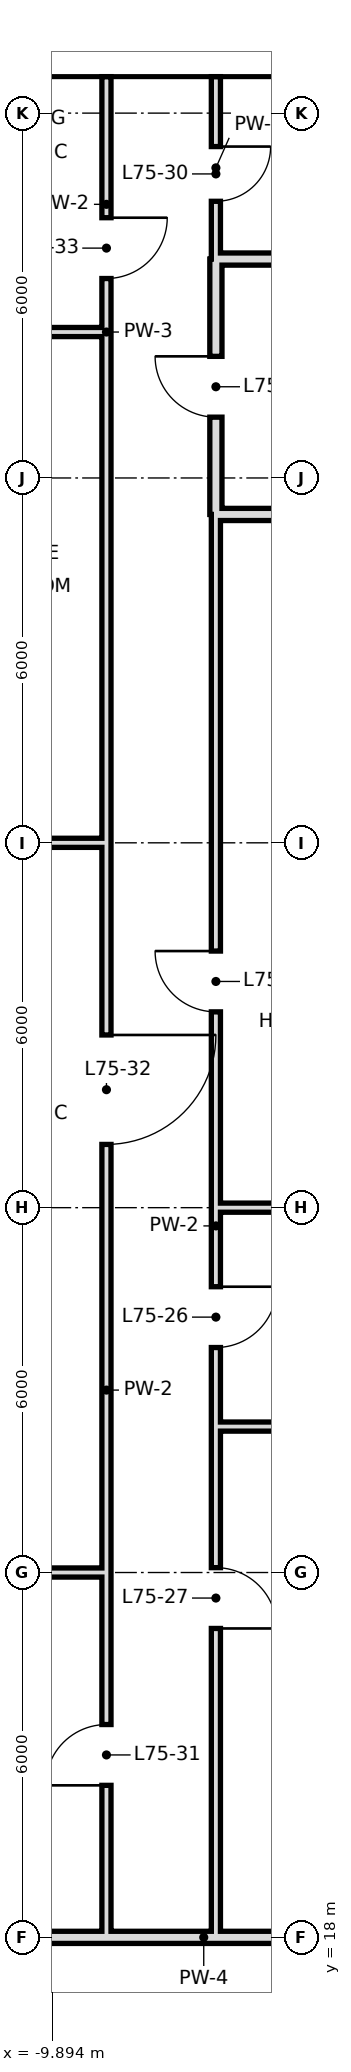
"""IFC4 building model, lengths in metres.
Left out: names, types, materials, properties, quantities, classifications, styles, units other than length and angle.
Written with IfcOpenShell. Run it as: python <this file> out.ifc"""

import sys

from ifc_helpers import new_model, si_unit, direction, frame, frame_2d, origin, place, context, subcontext, project, spatial, rectangle, extrude, element, fill, save


model = new_model("IFC4")
c1 = context("Model", 3, precision=1e-05, world=origin(), true_north=direction((0.0, 1.0)))
c2 = subcontext(c1, "Body", "Model", "MODEL_VIEW")
j1 = project(units=[si_unit("LENGTHUNIT", "METRE"), si_unit("PLANEANGLEUNIT", "RADIAN")], contexts=[c1])
p1 = place(None, origin())
s1 = spatial("IfcSite", under=j1, at=p1, CompositionType="ELEMENT")
p2 = place(p1, origin())
s2 = spatial("IfcBuilding", under=s1, at=p2, CompositionType="ELEMENT")
p3 = place(p2, frame((0.0, 0.0, 316.0)))
s3 = spatial("IfcBuildingStorey", under=s2, at=p3, CompositionType="ELEMENT", Elevation=316.0)
p4 = place(p3, frame((-7.2, 41.4, 0.0), z_axis=(0.0, 0.0, 1.0), x_axis=(0.0, 1.0, 0.0)))
e1 = element("IfcWall", 1, at=p4, inside=s3, PredefinedType="SOLIDWALL", context=c2, shape_type="SweptSolid", body=[
    extrude(rectangle(XDim=4.2, YDim=0.2, at=frame_2d((2.1, 0.0))), origin(), (0.0, 0.0, 1.0), 2.72),
])
p5 = place(p4, frame((1.6, 0.0, 0.0)))
e2 = element("IfcOpeningElement", 2, at=p5, cuts=e1, PredefinedType="OPENING", context=c2, shape_type="SweptSolid", body=[
    extrude(rectangle(XDim=1.0, YDim=2.4, at=frame_2d((0.5, 1.2))), frame((0.0, 0.11, 0.0), z_axis=(0.0, -1.0, 0.0), x_axis=(1.0, 0.0, 0.0)), (0.0, 0.0, 1.0), 0.22),
])
p6 = place(p3, frame((-7.2, 18.0, 0.0), z_axis=(0.0, 0.0, 1.0), x_axis=(0.0, 1.0, 0.0)))
e3 = element("IfcWall", 3, at=p6, inside=s3, PredefinedType="PARTITIONING", context=c2, shape_type="SweptSolid", body=[
    extrude(rectangle(XDim=23.4, YDim=0.15, at=frame_2d((11.7, 0.0))), origin(), (0.0, 0.0, 1.0), 3.42),
])
p7 = place(p6, frame((9.7, 0.0, 0.0)))
e4 = element("IfcOpeningElement", 4, at=p7, cuts=e3, PredefinedType="OPENING", context=c2, shape_type="SweptSolid", body=[
    extrude(rectangle(XDim=1.0, YDim=2.4, at=frame_2d((0.5, 1.2))), frame((0.0, 0.085, 0.0), z_axis=(0.0, -1.0, 0.0), x_axis=(1.0, 0.0, 0.0)), (0.0, 0.0, 1.0), 0.17),
])
p8 = place(p6, frame((5.08, 0.0, 0.0)))
e5 = element("IfcOpeningElement", 5, at=p8, cuts=e3, PredefinedType="OPENING", context=c2, shape_type="SweptSolid", body=[
    extrude(rectangle(XDim=1.0, YDim=2.4, at=frame_2d((0.5, 1.2))), frame((0.0, 0.085, 0.0), z_axis=(0.0, -1.0, 0.0), x_axis=(1.0, 0.0, 0.0)), (0.0, 0.0, 1.0), 0.17),
])
p9 = place(p6, frame((15.22, 0.0, 0.0)))
e6 = element("IfcOpeningElement", 6, at=p9, cuts=e3, PredefinedType="OPENING", context=c2, shape_type="SweptSolid", body=[
    extrude(rectangle(XDim=1.0, YDim=2.4, at=frame_2d((0.5, 1.2))), frame((0.0, 0.085, 0.0), z_axis=(0.0, -1.0, 0.0), x_axis=(1.0, 0.0, 0.0)), (0.0, 0.0, 1.0), 0.17),
])
p10 = place(p3, frame((-7.2, 45.6, 0.0), z_axis=(0.0, 0.0, 1.0), x_axis=(0.0, 1.0, 0.0)))
e7 = element("IfcWall", 7, at=p10, inside=s3, PredefinedType="PARTITIONING", context=c2, shape_type="SweptSolid", body=[
    extrude(rectangle(XDim=3.0, YDim=0.15, at=frame_2d((1.5, 0.0))), origin(), (0.0, 0.0, 1.0), 3.42),
])
p11 = place(p10, frame((0.95, 0.0, 0.0)))
e8 = element("IfcOpeningElement", 8, at=p11, cuts=e7, PredefinedType="OPENING", context=c2, shape_type="SweptSolid", body=[
    extrude(rectangle(XDim=0.9, YDim=2.4, at=frame_2d((0.45, 1.2))), frame((0.0, 0.085, 0.0), z_axis=(0.0, -1.0, 0.0), x_axis=(1.0, 0.0, 0.0)), (0.0, 0.0, 1.0), 0.17),
])
p12 = place(p3, frame((-9.0, 18.0, 0.0), z_axis=(0.0, 0.0, 1.0), x_axis=(0.0, 1.0, 0.0)))
e9 = element("IfcWall", 9, at=p12, inside=s3, PredefinedType="PARTITIONING", context=c2, shape_type="SweptSolid", body=[
    extrude(rectangle(XDim=18.0, YDim=0.15, at=frame_2d((9.0, 0.0))), origin(), (0.0, 0.0, 1.0), 3.42),
])
p13 = place(p12, frame((2.5, 0.0, 0.0)))
e10 = element("IfcOpeningElement", 10, at=p13, cuts=e9, PredefinedType="OPENING", context=c2, shape_type="SweptSolid", body=[
    extrude(rectangle(XDim=1.0, YDim=2.4, at=frame_2d((0.5, 1.2))), frame((0.0, 0.085, 0.0), z_axis=(0.0, -1.0, 0.0), x_axis=(1.0, 0.0, 0.0)), (0.0, 0.0, 1.0), 0.17),
])
p14 = place(p12, frame((13.04, 0.0, 0.0)))
e11 = element("IfcOpeningElement", 11, at=p14, cuts=e9, PredefinedType="OPENING", context=c2, shape_type="SweptSolid", body=[
    extrude(rectangle(XDim=1.8, YDim=2.4, at=frame_2d((0.9, 1.2))), frame((0.0, 0.085, 0.0), z_axis=(0.0, -1.0, 0.0), x_axis=(1.0, 0.0, 0.0)), (0.0, 0.0, 1.0), 0.17),
])
p15 = place(p3, frame((-9.0, 44.4, 0.0), z_axis=(0.0, 0.0, 1.0), x_axis=(0.0, 1.0, 0.0)))
e12 = element("IfcWall", 12, at=p15, inside=s3, PredefinedType="PARTITIONING", context=c2, shape_type="SweptSolid", body=[
    extrude(rectangle(XDim=4.2, YDim=0.15, at=frame_2d((2.1, 0.0))), origin(), (0.0, 0.0, 1.0), 3.42),
])
p16 = place(p15, frame((0.88, 0.0, 0.0)))
e13 = element("IfcOpeningElement", 13, at=p16, cuts=e12, PredefinedType="OPENING", context=c2, shape_type="SweptSolid", body=[
    extrude(rectangle(XDim=1.0, YDim=2.4, at=frame_2d((0.5, 1.2))), frame((0.0, 0.085, 0.0), z_axis=(0.0, -1.0, 0.0), x_axis=(1.0, 0.0, 0.0)), (0.0, 0.0, 1.0), 0.17),
])
p17 = place(p3, frame((-9.0, 36.0, 0.0), z_axis=(0.0, 0.0, 1.0), x_axis=(0.0, 1.0, 0.0)))
e14 = element("IfcWall", 14, at=p17, inside=s3, PredefinedType="PARTITIONING", context=c2, shape_type="SweptSolid", body=[
    extrude(rectangle(XDim=8.4, YDim=0.15, at=frame_2d((4.2, 0.0))), origin(), (0.0, 0.0, 1.0), 3.42),
])
p18 = place(p3, frame((-18.6, 18.0, 0.0), z_axis=(0.0, 0.0, 1.0), x_axis=(1.0, 0.0, 0.0)))
e15 = element("IfcWall", 15, at=p18, inside=s3, PredefinedType="SOLIDWALL", context=c2, shape_type="SweptSolid", body=[
    extrude(rectangle(XDim=21.7, YDim=0.2, at=frame_2d((10.85, 0.0))), origin(), (0.0, 0.0, 1.0), 2.72),
])
p19 = place(p3, frame((-18.0, 24.0, 0.0), z_axis=(0.0, 0.0, 1.0), x_axis=(1.0, 0.0, 0.0)))
e16 = element("IfcWall", 16, at=p19, inside=s3, PredefinedType="PARTITIONING", context=c2, shape_type="SweptSolid", body=[
    extrude(rectangle(XDim=9.0, YDim=0.15, at=frame_2d((4.5, 0.0))), origin(), (0.0, 0.0, 1.0), 2.72),
])
p20 = place(p3, frame((-7.2, 26.4, 0.0), z_axis=(0.0, 0.0, 1.0), x_axis=(1.0, 0.0, 0.0)))
e17 = element("IfcWall", 17, at=p20, inside=s3, PredefinedType="PARTITIONING", context=c2, shape_type="SweptSolid", body=[
    extrude(rectangle(XDim=10.3, YDim=0.15, at=frame_2d((5.15, 0.0))), origin(), (0.0, 0.0, 1.0), 3.42),
])
p21 = place(p3, frame((-7.2, 30.0, 0.0), z_axis=(0.0, 0.0, 1.0), x_axis=(1.0, 0.0, 0.0)))
e18 = element("IfcWall", 18, at=p21, inside=s3, PredefinedType="PARTITIONING", context=c2, shape_type="SweptSolid", body=[
    extrude(rectangle(XDim=10.3, YDim=0.15, at=frame_2d((5.15, 0.0))), origin(), (0.0, 0.0, 1.0), 2.72),
])
p22 = place(p3, frame((-12.0, 36.0, 0.0), z_axis=(0.0, 0.0, 1.0), x_axis=(1.0, 0.0, 0.0)))
e19 = element("IfcWall", 19, at=p22, inside=s3, PredefinedType="PARTITIONING", context=c2, shape_type="SweptSolid", body=[
    extrude(rectangle(XDim=3.0, YDim=0.15, at=frame_2d((1.5, 0.0))), origin(), (0.0, 0.0, 1.0), 2.72),
])
p23 = place(p3, frame((-7.2, 41.4, 0.0), z_axis=(0.0, 0.0, 1.0), x_axis=(1.0, 0.0, 0.0)))
e20 = element("IfcWall", 20, at=p23, inside=s3, PredefinedType="SOLIDWALL", context=c2, shape_type="SweptSolid", body=[
    extrude(rectangle(XDim=10.3, YDim=0.2, at=frame_2d((5.15, 0.0))), origin(), (0.0, 0.0, 1.0), 2.72),
])
p24 = place(p3, frame((-12.0, 44.4, 0.0), z_axis=(0.0, 0.0, 1.0), x_axis=(1.0, 0.0, 0.0)))
e21 = element("IfcWall", 21, at=p24, inside=s3, PredefinedType="PARTITIONING", context=c2, shape_type="SweptSolid", body=[
    extrude(rectangle(XDim=3.0, YDim=0.15, at=frame_2d((1.5, 0.0))), origin(), (0.0, 0.0, 1.0), 3.42),
])
p25 = place(p3, frame((-7.2, 45.6, 0.0), z_axis=(0.0, 0.0, 1.0), x_axis=(1.0, 0.0, 0.0)))
e22 = element("IfcWall", 22, at=p25, inside=s3, PredefinedType="SOLIDWALL", context=c2, shape_type="SweptSolid", body=[
    extrude(rectangle(XDim=10.3, YDim=0.2, at=frame_2d((5.15, 0.0))), origin(), (0.0, 0.0, 1.0), 2.72),
])
p26 = place(p7, origin())
e23 = element("IfcDoor", 23, at=p26, inside=s3, OperationType="SINGLE_SWING_RIGHT", PredefinedType="DOOR", context=c2, shape_type="SweptSolid", body=[
    extrude(rectangle(XDim=1.0, YDim=2.4, at=frame_2d((0.5, 1.2))), frame((0.0, 0.025, 0.0), z_axis=(0.0, -1.0, 0.0), x_axis=(1.0, 0.0, 0.0)), (0.0, 0.0, 1.0), 0.05),
])
fill(e4, e23)
p27 = place(p8, frame((1.0, 0.0, 0.0), z_axis=(0.0, 0.0, 1.0), x_axis=(-1.0, 0.0, 0.0)))
e24 = element("IfcDoor", 24, at=p27, inside=s3, OperationType="SINGLE_SWING_RIGHT", PredefinedType="DOOR", context=c2, shape_type="SweptSolid", body=[
    extrude(rectangle(XDim=1.0, YDim=2.4, at=frame_2d((0.5, 1.2))), frame((0.0, 0.025, 0.0), z_axis=(0.0, -1.0, 0.0), x_axis=(1.0, 0.0, 0.0)), (0.0, 0.0, 1.0), 0.05),
])
fill(e5, e24)
p28 = place(p9, frame((1.0, 0.0, 0.0), z_axis=(0.0, 0.0, 1.0), x_axis=(-1.0, 0.0, 0.0)))
e25 = element("IfcDoor", 25, at=p28, inside=s3, OperationType="SINGLE_SWING_LEFT", PredefinedType="DOOR", context=c2, shape_type="SweptSolid", body=[
    extrude(rectangle(XDim=1.0, YDim=2.4, at=frame_2d((0.5, 1.2))), frame((0.0, 0.025, 0.0), z_axis=(0.0, -1.0, 0.0), x_axis=(1.0, 0.0, 0.0)), (0.0, 0.0, 1.0), 0.05),
])
fill(e6, e25)
p29 = place(p5, frame((1.0, 0.0, 0.0), z_axis=(0.0, 0.0, 1.0), x_axis=(-1.0, 0.0, 0.0)))
e26 = element("IfcDoor", 26, at=p29, inside=s3, OperationType="SINGLE_SWING_LEFT", PredefinedType="DOOR", context=c2, shape_type="SweptSolid", body=[
    extrude(rectangle(XDim=1.0, YDim=2.4, at=frame_2d((0.5, 1.2))), frame((0.0, 0.025, 0.0), z_axis=(0.0, -1.0, 0.0), x_axis=(1.0, 0.0, 0.0)), (0.0, 0.0, 1.0), 0.05),
])
fill(e2, e26)
p30 = place(p11, origin())
e27 = element("IfcDoor", 27, at=p30, inside=s3, OperationType="SINGLE_SWING_RIGHT", PredefinedType="DOOR", context=c2, shape_type="SweptSolid", body=[
    extrude(rectangle(XDim=0.9, YDim=2.4, at=frame_2d((0.45, 1.2))), frame((0.0, 0.025, 0.0), z_axis=(0.0, -1.0, 0.0), x_axis=(1.0, 0.0, 0.0)), (0.0, 0.0, 1.0), 0.05),
])
fill(e8, e27)
p31 = place(p13, origin())
e28 = element("IfcDoor", 28, at=p31, inside=s3, OperationType="SINGLE_SWING_LEFT", PredefinedType="DOOR", context=c2, shape_type="SweptSolid", body=[
    extrude(rectangle(XDim=1.0, YDim=2.4, at=frame_2d((0.5, 1.2))), frame((0.0, 0.025, 0.0), z_axis=(0.0, -1.0, 0.0), x_axis=(1.0, 0.0, 0.0)), (0.0, 0.0, 1.0), 0.05),
])
fill(e10, e28)
p32 = place(p14, origin())
e29 = element("IfcDoor", 29, at=p32, inside=s3, OperationType="SINGLE_SWING_RIGHT", PredefinedType="DOOR", context=c2, shape_type="SweptSolid", body=[
    extrude(rectangle(XDim=1.8, YDim=2.4, at=frame_2d((0.9, 1.2))), frame((0.0, 0.025, 0.0), z_axis=(0.0, -1.0, 0.0), x_axis=(1.0, 0.0, 0.0)), (0.0, 0.0, 1.0), 0.05),
])
fill(e11, e29)
p33 = place(p16, origin())
e30 = element("IfcDoor", 30, at=p33, inside=s3, OperationType="SINGLE_SWING_RIGHT", PredefinedType="DOOR", context=c2, shape_type="SweptSolid", body=[
    extrude(rectangle(XDim=1.0, YDim=2.4, at=frame_2d((0.5, 1.2))), frame((0.0, 0.025, 0.0), z_axis=(0.0, -1.0, 0.0), x_axis=(1.0, 0.0, 0.0)), (0.0, 0.0, 1.0), 0.05),
])
fill(e13, e30)
save(model, sys.argv[1])
